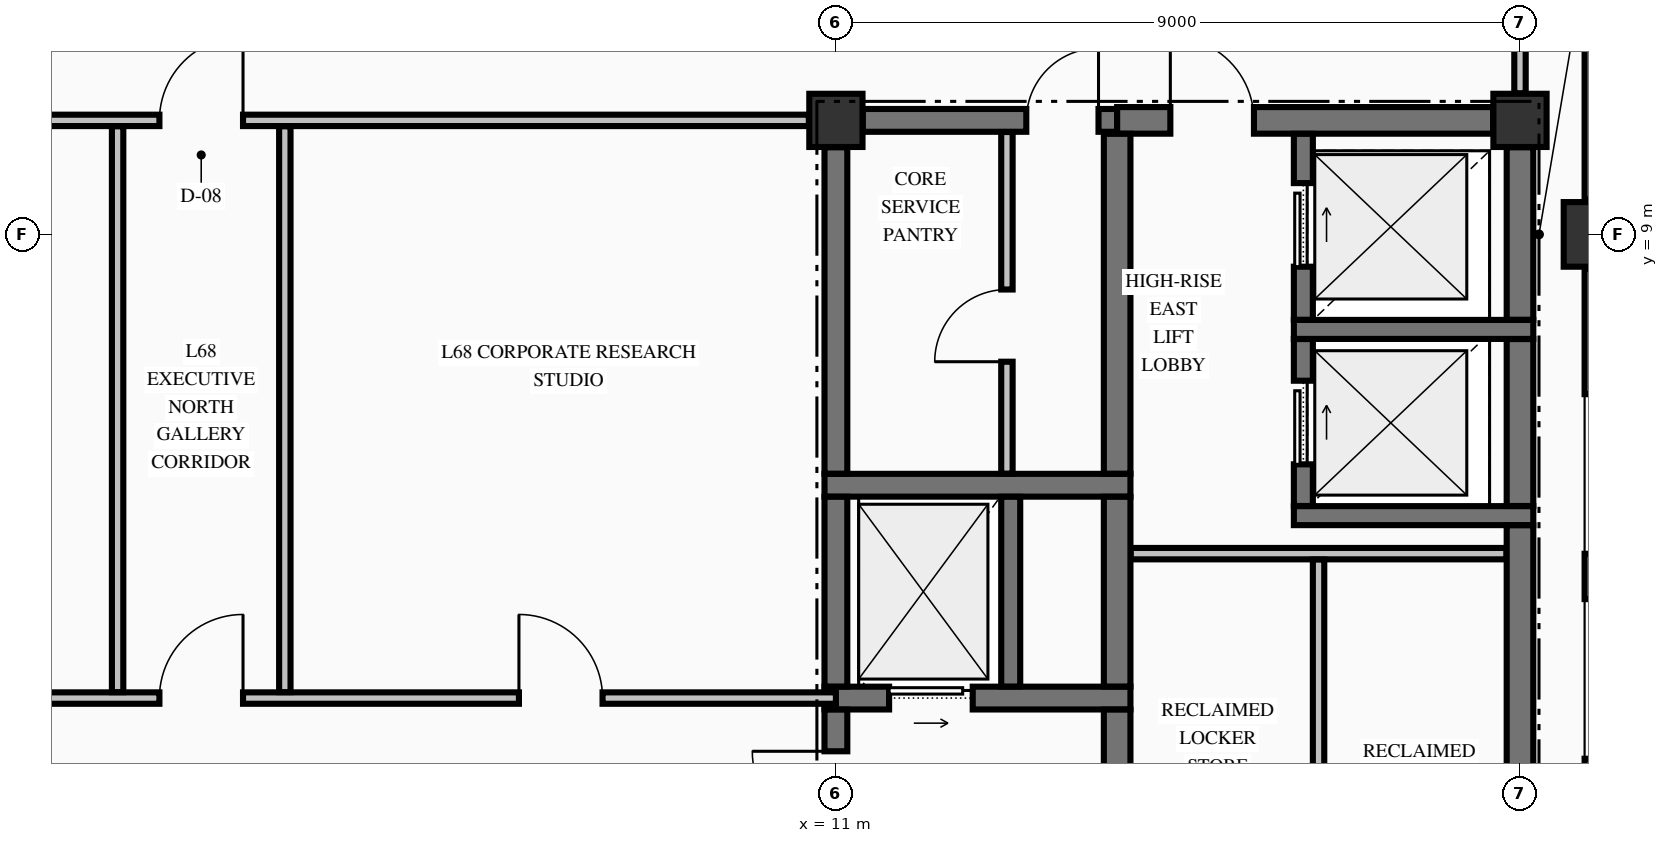
"""IFC4 building model, lengths in metres.
Left out: names, types, materials, properties, quantities, classifications, styles, units other than length and angle.
Written with IfcOpenShell. Run it as: python <this file> out.ifc"""

import sys

from ifc_helpers import new_model, si_unit, direction, frame, frame_2d, origin, origin_2d, place, context, subcontext, project, spatial, rectangle, extrude, element, fill, save


model = new_model("IFC4")
c1 = context("Model", 3, precision=1e-05, world=origin(), true_north=direction((0.0, 1.0)))
c2 = subcontext(c1, "Body", "Model", "MODEL_VIEW")
j1 = project(units=[si_unit("LENGTHUNIT", "METRE"), si_unit("PLANEANGLEUNIT", "RADIAN")], contexts=[c1])
p1 = place(None, origin())
s1 = spatial("IfcSite", under=j1, at=p1, CompositionType="ELEMENT")
p2 = place(p1, origin())
s2 = spatial("IfcBuilding", under=s1, at=p2, CompositionType="ELEMENT")
p3 = place(p2, frame((0.0, 0.0, 257.66)))
s3 = spatial("IfcBuildingStorey", under=s2, at=p3, CompositionType="ELEMENT", Elevation=257.66)
p4 = place(p3, frame((21.0, 9.0, -0.25), z_axis=(0.0, 0.0, 1.0), x_axis=(1.0, 0.0, 0.0)))
e1 = element("IfcColumn", 1, at=p4, inside=s3, PredefinedType="COLUMN", context=c2, shape_type="SweptSolid", body=[
    extrude(rectangle(XDim=0.85, YDim=0.85, at=origin_2d()), origin(), (0.0, 0.0, 1.0), 3.23),
])
for number, where, z_axis, x_axis in (
    (2, (11.0, 10.5, -0.25), (0.0, 0.0, 1.0), (1.0, 0.0, 0.0)),
    (3, (20.0, 10.5, -0.25), (0.0, 0.0, 1.0), (1.0, 0.0, 0.0)),
):
    element("IfcColumn", number, at=place(p3, frame(where, z_axis=z_axis, x_axis=x_axis)), inside=s3, PredefinedType="COLUMN", context=c2, shape_type="SweptSolid", body=[
        extrude(rectangle(XDim=0.7, YDim=0.7, at=origin_2d()), origin(), (0.0, 0.0, 1.0), 3.23),
    ])
p5 = place(p3, frame((21.0, 0.455, 0.0), z_axis=(0.0, 0.0, 1.0), x_axis=(0.0, 1.0, 0.0)))
e4 = element("IfcWall", 4, at=p5, inside=s3, PredefinedType="STANDARD", context=c2, shape_type="SweptSolid", body=[
    extrude(rectangle(XDim=8.09, YDim=0.3, at=frame_2d((4.045, 0.0))), origin(), (0.0, 0.0, 1.0), 2.372),
])
p6 = place(p5, frame((1.647, 0.0, 0.7)))
e5 = element("IfcOpeningElement", 5, at=p6, cuts=e4, PredefinedType="OPENING", context=c2, shape_type="SweptSolid", body=[
    extrude(rectangle(XDim=2.1, YDim=1.5, at=frame_2d((1.05, 0.75))), frame((0.0, 0.16, 0.0), z_axis=(0.0, -1.0, 0.0), x_axis=(1.0, 0.0, 0.0)), (0.0, 0.0, 1.0), 0.32),
])
p7 = place(p5, frame((4.343, 0.0, 0.7)))
e6 = element("IfcOpeningElement", 6, at=p7, cuts=e4, PredefinedType="OPENING", context=c2, shape_type="SweptSolid", body=[
    extrude(rectangle(XDim=2.1, YDim=1.5, at=frame_2d((1.05, 0.75))), frame((0.0, 0.16, 0.0), z_axis=(0.0, -1.0, 0.0), x_axis=(1.0, 0.0, 0.0)), (0.0, 0.0, 1.0), 0.32),
])
p8 = place(p3, frame((21.0, 9.455, 0.0), z_axis=(0.0, 0.0, 1.0), x_axis=(0.0, 1.0, 0.0)))
e7 = element("IfcWall", 7, at=p8, inside=s3, PredefinedType="STANDARD", context=c2, shape_type="SweptSolid", body=[
    extrude(rectangle(XDim=8.09, YDim=0.3, at=frame_2d((4.045, 0.0))), origin(), (0.0, 0.0, 1.0), 2.372),
])
p9 = place(p3, frame((10.85, 2.9, 0.0), z_axis=(0.0, 0.0, 1.0), x_axis=(1.0, 0.0, 0.0)))
e8 = element("IfcWall", 8, at=p9, inside=s3, PredefinedType="SHEAR", context=c2, shape_type="SweptSolid", body=[
    extrude(rectangle(XDim=4.025, YDim=0.3, at=frame_2d((2.012, 0.0))), origin(), (0.0, 0.0, 1.0), 2.98),
])
p10 = place(p9, frame((0.85, 0.0, 0.0)))
e9 = element("IfcOpeningElement", 9, at=p10, cuts=e8, PredefinedType="OPENING", context=c2, shape_type="SweptSolid", body=[
    extrude(rectangle(XDim=1.1, YDim=2.2, at=frame_2d((0.55, 1.1))), frame((0.0, 0.16, 0.0), z_axis=(0.0, -1.0, 0.0), x_axis=(1.0, 0.0, 0.0)), (0.0, 0.0, 1.0), 0.32),
])
p11 = place(p3, frame((17.025, 5.3, 0.0), z_axis=(0.0, 0.0, 1.0), x_axis=(1.0, 0.0, 0.0)))
e10 = element("IfcWall", 10, at=p11, inside=s3, PredefinedType="SOLIDWALL", context=c2, shape_type="SweptSolid", body=[
    extrude(rectangle(XDim=3.15, YDim=0.25, at=frame_2d((1.575, 0.0))), origin(), (0.0, 0.0, 1.0), 2.98),
])
p12 = place(p3, frame((10.85, 5.7, 0.0), z_axis=(0.0, 0.0, 1.0), x_axis=(1.0, 0.0, 0.0)))
e11 = element("IfcWall", 11, at=p12, inside=s3, PredefinedType="SHEAR", context=c2, shape_type="SweptSolid", body=[
    extrude(rectangle(XDim=4.025, YDim=0.3, at=frame_2d((2.012, 0.0))), origin(), (0.0, 0.0, 1.0), 2.98),
])
p13 = place(p3, frame((17.025, 7.75, 0.0), z_axis=(0.0, 0.0, 1.0), x_axis=(1.0, 0.0, 0.0)))
e12 = element("IfcWall", 12, at=p13, inside=s3, PredefinedType="SOLIDWALL", context=c2, shape_type="SweptSolid", body=[
    extrude(rectangle(XDim=3.15, YDim=0.25, at=frame_2d((1.575, 0.0))), origin(), (0.0, 0.0, 1.0), 2.98),
])
p14 = place(p3, frame((11.354, 10.5, 0.0), z_axis=(0.0, 0.0, 1.0), x_axis=(1.0, 0.0, 0.0)))
e13 = element("IfcWall", 13, at=p14, inside=s3, PredefinedType="SHEAR", context=c2, shape_type="SweptSolid", body=[
    extrude(rectangle(XDim=3.346, YDim=0.3, at=frame_2d((1.673, 0.0))), origin(), (0.0, 0.0, 1.0), 2.98),
])
p15 = place(p14, frame((2.151, 0.0, 0.0)))
e14 = element("IfcOpeningElement", 14, at=p15, cuts=e13, PredefinedType="OPENING", context=c2, shape_type="SweptSolid", body=[
    extrude(rectangle(XDim=0.95, YDim=2.15, at=frame_2d((0.475, 1.075))), frame((0.0, 0.16, 0.0), z_axis=(0.0, -1.0, 0.0), x_axis=(1.0, 0.0, 0.0)), (0.0, 0.0, 1.0), 0.32),
])
p16 = place(p3, frame((14.7, 10.5, 0.0), z_axis=(0.0, 0.0, 1.0), x_axis=(1.0, 0.0, 0.0)))
e15 = element("IfcWall", 15, at=p16, inside=s3, PredefinedType="SHEAR", context=c2, shape_type="SweptSolid", body=[
    extrude(rectangle(XDim=4.946, YDim=0.35, at=frame_2d((2.473, 0.0))), origin(), (0.0, 0.0, 1.0), 2.98),
])
p17 = place(p16, frame((0.7, 0.0, 0.0)))
e16 = element("IfcOpeningElement", 16, at=p17, cuts=e15, PredefinedType="OPENING", context=c2, shape_type="SweptSolid", body=[
    extrude(rectangle(XDim=1.1, YDim=2.15, at=frame_2d((0.55, 1.075))), frame((0.0, 0.185, 0.0), z_axis=(0.0, -1.0, 0.0), x_axis=(1.0, 0.0, 0.0)), (0.0, 0.0, 1.0), 0.37),
])
p18 = place(p3, frame((-11.0, 2.9, 0.0), z_axis=(0.0, 0.0, 1.0), x_axis=(1.0, 0.0, 0.0)))
e17 = element("IfcWall", 17, at=p18, inside=s3, PredefinedType="PARTITIONING", context=c2, shape_type="SweptSolid", body=[
    extrude(rectangle(XDim=22.0, YDim=0.15, at=frame_2d((11.0, 0.0))), origin(), (0.0, 0.0, 1.0), 2.98),
])
p19 = place(p18, frame((13.1, 0.0, 0.0)))
e18 = element("IfcOpeningElement", 18, at=p19, cuts=e17, PredefinedType="OPENING", context=c2, shape_type="SweptSolid", body=[
    extrude(rectangle(XDim=1.1, YDim=2.15, at=frame_2d((0.55, 1.075))), frame((0.0, 0.085, 0.0), z_axis=(0.0, -1.0, 0.0), x_axis=(1.0, 0.0, 0.0)), (0.0, 0.0, 1.0), 0.17),
])
p20 = place(p18, frame((5.755, 0.0, 0.0)))
e19 = element("IfcOpeningElement", 19, at=p20, cuts=e17, PredefinedType="OPENING", context=c2, shape_type="SweptSolid", body=[
    extrude(rectangle(XDim=1.05, YDim=2.15, at=frame_2d((0.525, 1.075))), frame((0.0, 0.085, 0.0), z_axis=(0.0, -1.0, 0.0), x_axis=(1.0, 0.0, 0.0)), (0.0, 0.0, 1.0), 0.17),
])
p21 = place(p18, frame((17.83, 0.0, 0.0)))
e20 = element("IfcOpeningElement", 20, at=p21, cuts=e17, PredefinedType="OPENING", context=c2, shape_type="SweptSolid", body=[
    extrude(rectangle(XDim=1.1, YDim=2.15, at=frame_2d((0.55, 1.075))), frame((0.0, 0.085, 0.0), z_axis=(0.0, -1.0, 0.0), x_axis=(1.0, 0.0, 0.0)), (0.0, 0.0, 1.0), 0.17),
])
p22 = place(p3, frame((14.878, 4.8, 0.0), z_axis=(0.0, 0.0, 1.0), x_axis=(1.0, 0.0, 0.0)))
e21 = element("IfcWall", 21, at=p22, inside=s3, PredefinedType="PARTITIONING", context=c2, shape_type="SweptSolid", body=[
    extrude(rectangle(XDim=4.944, YDim=0.15, at=frame_2d((2.472, 0.0))), origin(), (0.0, 0.0, 1.0), 2.98),
])
p23 = place(p3, frame((-10.644, 10.5, 0.0), z_axis=(0.0, 0.0, 1.0), x_axis=(1.0, 0.0, 0.0)))
e22 = element("IfcWall", 22, at=p23, inside=s3, PredefinedType="PARTITIONING", context=c2, shape_type="SweptSolid", body=[
    extrude(rectangle(XDim=21.288, YDim=0.15, at=frame_2d((10.644, 0.0))), origin(), (0.0, 0.0, 1.0), 2.98),
])
p24 = place(p23, frame((12.744, 0.0, 0.0)))
e23 = element("IfcOpeningElement", 23, at=p24, cuts=e22, PredefinedType="OPENING", context=c2, shape_type="SweptSolid", body=[
    extrude(rectangle(XDim=1.1, YDim=2.15, at=frame_2d((0.55, 1.075))), frame((0.0, 0.085, 0.0), z_axis=(0.0, -1.0, 0.0), x_axis=(1.0, 0.0, 0.0)), (0.0, 0.0, 1.0), 0.17),
])
p25 = place(p3, frame((11.0, 0.354, 0.0), z_axis=(0.0, 0.0, 1.0), x_axis=(0.0, 1.0, 0.0)))
e24 = element("IfcWall", 24, at=p25, inside=s3, PredefinedType="SHEAR", context=c2, shape_type="SweptSolid", body=[
    extrude(rectangle(XDim=2.394, YDim=0.3, at=frame_2d((1.197, 0.0))), origin(), (0.0, 0.0, 1.0), 2.98),
])
p26 = place(p25, frame((0.746, 0.0, 0.0)))
e25 = element("IfcOpeningElement", 25, at=p26, cuts=e24, PredefinedType="OPENING", context=c2, shape_type="SweptSolid", body=[
    extrude(rectangle(XDim=1.1, YDim=2.15, at=frame_2d((0.55, 1.075))), frame((0.0, 0.16, 0.0), z_axis=(0.0, -1.0, 0.0), x_axis=(1.0, 0.0, 0.0)), (0.0, 0.0, 1.0), 0.32),
])
p27 = place(p3, frame((11.0, 3.052, 0.0), z_axis=(0.0, 0.0, 1.0), x_axis=(0.0, 1.0, 0.0)))
e26 = element("IfcWall", 26, at=p27, inside=s3, PredefinedType="SHEAR", context=c2, shape_type="SweptSolid", body=[
    extrude(rectangle(XDim=2.496, YDim=0.3, at=frame_2d((1.248, 0.0))), origin(), (0.0, 0.0, 1.0), 2.98),
])
p28 = place(p3, frame((11.0, 5.852, 0.0), z_axis=(0.0, 0.0, 1.0), x_axis=(0.0, 1.0, 0.0)))
e27 = element("IfcWall", 27, at=p28, inside=s3, PredefinedType="SHEAR", context=c2, shape_type="SweptSolid", body=[
    extrude(rectangle(XDim=4.294, YDim=0.3, at=frame_2d((2.147, 0.0))), origin(), (0.0, 0.0, 1.0), 2.98),
])
p29 = place(p3, frame((13.3, 3.052, 0.0), z_axis=(0.0, 0.0, 1.0), x_axis=(0.0, 1.0, 0.0)))
e28 = element("IfcWall", 28, at=p29, inside=s3, PredefinedType="SOLIDWALL", context=c2, shape_type="SweptSolid", body=[
    extrude(rectangle(XDim=2.496, YDim=0.25, at=frame_2d((1.248, 0.0))), origin(), (0.0, 0.0, 1.0), 2.98),
])
p30 = place(p3, frame((14.7, -0.098, 0.0), z_axis=(0.0, 0.0, 1.0), x_axis=(0.0, 1.0, 0.0)))
e29 = element("IfcWall", 29, at=p30, inside=s3, PredefinedType="SHEAR", context=c2, shape_type="SweptSolid", body=[
    extrude(rectangle(XDim=2.846, YDim=0.35, at=frame_2d((1.423, 0.0))), origin(), (0.0, 0.0, 1.0), 2.98),
])
p31 = place(p3, frame((14.7, 3.052, 0.0), z_axis=(0.0, 0.0, 1.0), x_axis=(0.0, 1.0, 0.0)))
e30 = element("IfcWall", 30, at=p31, inside=s3, PredefinedType="SHEAR", context=c2, shape_type="SweptSolid", body=[
    extrude(rectangle(XDim=2.496, YDim=0.35, at=frame_2d((1.248, 0.0))), origin(), (0.0, 0.0, 1.0), 2.98),
])
p32 = place(p3, frame((14.7, 5.852, 0.0), z_axis=(0.0, 0.0, 1.0), x_axis=(0.0, 1.0, 0.0)))
e31 = element("IfcWall", 31, at=p32, inside=s3, PredefinedType="SHEAR", context=c2, shape_type="SweptSolid", body=[
    extrude(rectangle(XDim=4.471, YDim=0.35, at=frame_2d((2.235, 0.0))), origin(), (0.0, 0.0, 1.0), 2.98),
])
p33 = place(p3, frame((17.15, 5.427, 0.0), z_axis=(0.0, 0.0, 1.0), x_axis=(0.0, 1.0, 0.0)))
e32 = element("IfcWall", 32, at=p33, inside=s3, PredefinedType="SOLIDWALL", context=c2, shape_type="SweptSolid", body=[
    extrude(rectangle(XDim=2.196, YDim=0.25, at=frame_2d((1.098, 0.0))), origin(), (0.0, 0.0, 1.0), 2.98),
])
p34 = place(p33, frame((0.548, 0.0, 0.0)))
e33 = element("IfcOpeningElement", 33, at=p34, cuts=e32, PredefinedType="OPENING", context=c2, shape_type="SweptSolid", body=[
    extrude(rectangle(XDim=1.1, YDim=2.2, at=frame_2d((0.55, 1.1))), frame((0.0, 0.135, 0.0), z_axis=(0.0, -1.0, 0.0), x_axis=(1.0, 0.0, 0.0)), (0.0, 0.0, 1.0), 0.27),
])
p35 = place(p3, frame((17.15, 7.877, 0.0), z_axis=(0.0, 0.0, 1.0), x_axis=(0.0, 1.0, 0.0)))
e34 = element("IfcWall", 34, at=p35, inside=s3, PredefinedType="SOLIDWALL", context=c2, shape_type="SweptSolid", body=[
    extrude(rectangle(XDim=2.446, YDim=0.25, at=frame_2d((1.223, 0.0))), origin(), (0.0, 0.0, 1.0), 2.98),
])
p36 = place(p35, frame((0.698, 0.0, 0.0)))
e35 = element("IfcOpeningElement", 35, at=p36, cuts=e34, PredefinedType="OPENING", context=c2, shape_type="SweptSolid", body=[
    extrude(rectangle(XDim=1.1, YDim=2.2, at=frame_2d((0.55, 1.1))), frame((0.0, 0.135, 0.0), z_axis=(0.0, -1.0, 0.0), x_axis=(1.0, 0.0, 0.0)), (0.0, 0.0, 1.0), 0.27),
])
p37 = place(p3, frame((20.0, -9.596, 0.0), z_axis=(0.0, 0.0, 1.0), x_axis=(0.0, 1.0, 0.0)))
e36 = element("IfcWall", 36, at=p37, inside=s3, PredefinedType="SHEAR", context=c2, shape_type="SweptSolid", body=[
    extrude(rectangle(XDim=14.769, YDim=0.35, at=frame_2d((7.385, 0.0))), origin(), (0.0, 0.0, 1.0), 2.98),
])
p38 = place(p3, frame((20.0, 5.427, 0.0), z_axis=(0.0, 0.0, 1.0), x_axis=(0.0, 1.0, 0.0)))
e37 = element("IfcWall", 37, at=p38, inside=s3, PredefinedType="SHEAR", context=c2, shape_type="SweptSolid", body=[
    extrude(rectangle(XDim=2.196, YDim=0.35, at=frame_2d((1.098, 0.0))), origin(), (0.0, 0.0, 1.0), 2.98),
])
p39 = place(p3, frame((20.0, 7.877, 0.0), z_axis=(0.0, 0.0, 1.0), x_axis=(0.0, 1.0, 0.0)))
e38 = element("IfcWall", 38, at=p39, inside=s3, PredefinedType="SHEAR", context=c2, shape_type="SweptSolid", body=[
    extrude(rectangle(XDim=2.269, YDim=0.35, at=frame_2d((1.135, 0.0))), origin(), (0.0, 0.0, 1.0), 2.98),
])
for number, where, z_axis, x_axis in (
    (39, (1.55, 2.978, 0.0), (0.0, 0.0, 1.0), (0.0, 1.0, 0.0)),
    (40, (3.75, 2.978, 0.0), (0.0, 0.0, 1.0), (0.0, 1.0, 0.0)),
):
    element("IfcWall", number, at=place(p3, frame(where, z_axis=z_axis, x_axis=x_axis)), inside=s3, PredefinedType="PARTITIONING", context=c2, shape_type="SweptSolid", body=[
        extrude(rectangle(XDim=7.444, YDim=0.15, at=frame_2d((3.722, 0.0))), origin(), (0.0, 0.0, 1.0), 2.98),
    ])
p40 = place(p3, frame((13.25, 5.853, 0.0), z_axis=(0.0, 0.0, 1.0), x_axis=(0.0, 1.0, 0.0)))
e41 = element("IfcWall", 41, at=p40, inside=s3, PredefinedType="PARTITIONING", context=c2, shape_type="SweptSolid", body=[
    extrude(rectangle(XDim=4.494, YDim=0.15, at=frame_2d((2.247, 0.0))), origin(), (0.0, 0.0, 1.0), 2.98),
])
p41 = place(p40, frame((1.472, 0.0, 0.0)))
e42 = element("IfcOpeningElement", 42, at=p41, cuts=e41, PredefinedType="OPENING", context=c2, shape_type="SweptSolid", body=[
    extrude(rectangle(XDim=0.95, YDim=2.15, at=frame_2d((0.475, 1.075))), frame((0.0, 0.085, 0.0), z_axis=(0.0, -1.0, 0.0), x_axis=(1.0, 0.0, 0.0)), (0.0, 0.0, 1.0), 0.17),
])
p42 = place(p3, frame((17.35, -2.422, 0.0), z_axis=(0.0, 0.0, 1.0), x_axis=(0.0, 1.0, 0.0)))
e43 = element("IfcWall", 43, at=p42, inside=s3, PredefinedType="PARTITIONING", context=c2, shape_type="SweptSolid", body=[
    extrude(rectangle(XDim=7.144, YDim=0.15, at=frame_2d((3.572, 0.0))), origin(), (0.0, 0.0, 1.0), 2.98),
])
p43 = place(p3, frame((20.0, 10.856, 0.0), z_axis=(0.0, 0.0, 1.0), x_axis=(0.0, 1.0, 0.0)))
e44 = element("IfcWall", 44, at=p43, inside=s3, PredefinedType="PARTITIONING", context=c2, shape_type="SweptSolid", body=[
    extrude(rectangle(XDim=1.816, YDim=0.15, at=frame_2d((0.908, 0.0))), origin(), (0.0, 0.0, 1.0), 2.57),
])
p44 = place(p26, origin())
e45 = element("IfcDoor", 45, at=p44, inside=s3, OperationType="SINGLE_SWING_RIGHT", PredefinedType="DOOR", context=c2, shape_type="SweptSolid", body=[
    extrude(rectangle(XDim=1.1, YDim=2.15, at=frame_2d((0.55, 1.075))), frame((0.0, 0.025, 0.0), z_axis=(0.0, -1.0, 0.0), x_axis=(1.0, 0.0, 0.0)), (0.0, 0.0, 1.0), 0.05),
])
fill(e25, e45)
p45 = place(p10, origin())
e46 = element("IfcDoor", 46, at=p45, inside=s3, OperationType="SLIDING_TO_RIGHT", PredefinedType="DOOR", context=c2, shape_type="SweptSolid", body=[
    extrude(rectangle(XDim=1.1, YDim=2.2, at=frame_2d((0.55, 1.1))), frame((0.0, 0.025, 0.0), z_axis=(0.0, -1.0, 0.0), x_axis=(1.0, 0.0, 0.0)), (0.0, 0.0, 1.0), 0.05),
])
fill(e9, e46)
p46 = place(p15, origin())
e47 = element("IfcDoor", 47, at=p46, inside=s3, OperationType="SINGLE_SWING_RIGHT", PredefinedType="DOOR", context=c2, shape_type="SweptSolid", body=[
    extrude(rectangle(XDim=0.95, YDim=2.15, at=frame_2d((0.475, 1.075))), frame((0.0, 0.025, 0.0), z_axis=(0.0, -1.0, 0.0), x_axis=(1.0, 0.0, 0.0)), (0.0, 0.0, 1.0), 0.05),
])
fill(e14, e47)
p47 = place(p41, origin())
e48 = element("IfcDoor", 48, at=p47, inside=s3, OperationType="SINGLE_SWING_LEFT", PredefinedType="DOOR", context=c2, shape_type="SweptSolid", body=[
    extrude(rectangle(XDim=0.95, YDim=2.15, at=frame_2d((0.475, 1.075))), frame((0.0, 0.025, 0.0), z_axis=(0.0, -1.0, 0.0), x_axis=(1.0, 0.0, 0.0)), (0.0, 0.0, 1.0), 0.05),
])
fill(e42, e48)
p48 = place(p34, origin())
e49 = element("IfcDoor", 49, at=p48, inside=s3, OperationType="SLIDING_TO_RIGHT", PredefinedType="DOOR", context=c2, shape_type="SweptSolid", body=[
    extrude(rectangle(XDim=1.1, YDim=2.2, at=frame_2d((0.55, 1.1))), frame((0.0, 0.025, 0.0), z_axis=(0.0, -1.0, 0.0), x_axis=(1.0, 0.0, 0.0)), (0.0, 0.0, 1.0), 0.05),
])
fill(e33, e49)
p49 = place(p36, origin())
e50 = element("IfcDoor", 50, at=p49, inside=s3, OperationType="SLIDING_TO_RIGHT", PredefinedType="DOOR", context=c2, shape_type="SweptSolid", body=[
    extrude(rectangle(XDim=1.1, YDim=2.2, at=frame_2d((0.55, 1.1))), frame((0.0, 0.025, 0.0), z_axis=(0.0, -1.0, 0.0), x_axis=(1.0, 0.0, 0.0)), (0.0, 0.0, 1.0), 0.05),
])
fill(e35, e50)
p50 = place(p17, origin())
e51 = element("IfcDoor", 51, at=p50, inside=s3, OperationType="SINGLE_SWING_LEFT", PredefinedType="DOOR", context=c2, shape_type="SweptSolid", body=[
    extrude(rectangle(XDim=1.1, YDim=2.15, at=frame_2d((0.55, 1.075))), frame((0.0, 0.025, 0.0), z_axis=(0.0, -1.0, 0.0), x_axis=(1.0, 0.0, 0.0)), (0.0, 0.0, 1.0), 0.05),
])
fill(e16, e51)
p51 = place(p24, origin())
e52 = element("IfcDoor", 52, at=p51, inside=s3, OperationType="SINGLE_SWING_RIGHT", PredefinedType="DOOR", context=c2, shape_type="SweptSolid", body=[
    extrude(rectangle(XDim=1.1, YDim=2.15, at=frame_2d((0.55, 1.075))), frame((0.0, 0.025, 0.0), z_axis=(0.0, -1.0, 0.0), x_axis=(1.0, 0.0, 0.0)), (0.0, 0.0, 1.0), 0.05),
])
fill(e23, e52)
p52 = place(p19, origin())
e53 = element("IfcDoor", 53, at=p52, inside=s3, OperationType="SINGLE_SWING_RIGHT", PredefinedType="DOOR", context=c2, shape_type="SweptSolid", body=[
    extrude(rectangle(XDim=1.1, YDim=2.15, at=frame_2d((0.55, 1.075))), frame((0.0, 0.025, 0.0), z_axis=(0.0, -1.0, 0.0), x_axis=(1.0, 0.0, 0.0)), (0.0, 0.0, 1.0), 0.05),
])
fill(e18, e53)
p53 = place(p21, origin())
e54 = element("IfcDoor", 54, at=p53, inside=s3, OperationType="SINGLE_SWING_LEFT", PredefinedType="DOOR", context=c2, shape_type="SweptSolid", body=[
    extrude(rectangle(XDim=1.1, YDim=2.15, at=frame_2d((0.55, 1.075))), frame((0.0, 0.025, 0.0), z_axis=(0.0, -1.0, 0.0), x_axis=(1.0, 0.0, 0.0)), (0.0, 0.0, 1.0), 0.05),
])
fill(e20, e54)
save(model, sys.argv[1])
